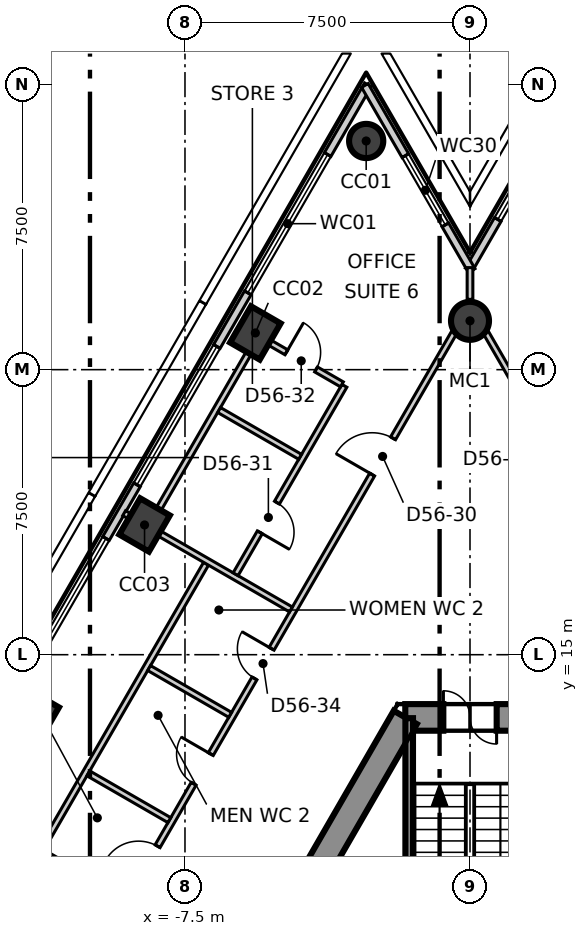
"""IFC4 building model, lengths in metres.
Left out: names, types, materials, properties, quantities, classifications, styles, units other than length and angle.
Written with IfcOpenShell. Run it as: python <this file> out.ifc"""

import sys

from ifc_helpers import new_model, si_unit, direction, frame, frame_2d, origin, origin_2d, place, context, subcontext, project, spatial, polyline, rectangle, circle, outline, extrude, element, fill, save


model = new_model("IFC4")
c1 = context("Model", 3, precision=1e-05, world=origin(), true_north=direction((0.0, 1.0)))
c2 = subcontext(c1, "Body", "Model", "MODEL_VIEW")
j1 = project(units=[si_unit("LENGTHUNIT", "METRE"), si_unit("PLANEANGLEUNIT", "RADIAN")], contexts=[c1])
p1 = place(None, origin())
s1 = spatial("IfcSite", under=j1, at=p1, CompositionType="ELEMENT")
p2 = place(p1, origin())
s2 = spatial("IfcBuilding", under=s1, at=p2, CompositionType="ELEMENT")
p3 = place(p2, frame((0.0, 0.0, 239.3)))
s3 = spatial("IfcBuildingStorey", under=s2, at=p3, CompositionType="ELEMENT", Elevation=239.3)
p4 = place(p3, frame((1.703, 13.35, -0.3), z_axis=(0.0, 0.0, 1.0), x_axis=(-1.0, 0.0, 0.0)))
e1 = element("IfcWall", 1, at=p4, inside=s3, PredefinedType="SHEAR", context=c2, shape_type="SweptSolid", body=[
    extrude(outline(polyline([(-0.202, -0.35), (1.703, -0.35), (3.608, -0.35), (3.204, 0.35), (1.703, 0.35), (0.202, 0.35), (-0.202, -0.35)])), origin(), (0.0, 0.0, 1.0), 4.0),
])
p5 = place(p4, frame((1.003, 0.0, 0.3)))
e2 = element("IfcOpeningElement", 2, at=p5, cuts=e1, PredefinedType="OPENING", context=c2, shape_type="SweptSolid", body=[
    extrude(rectangle(XDim=1.4, YDim=2.1, at=frame_2d((0.7, 1.05))), frame((0.0, 0.36, 0.0), z_axis=(0.0, -1.0, 0.0), x_axis=(1.0, 0.0, 0.0)), (0.0, 0.0, 1.0), 0.72),
])
p6 = place(p3, frame((-1.703, 13.35, -0.3), z_axis=(0.0, 0.0, 1.0), x_axis=(-0.500011533395, -0.866018744874, 0.0)))
e3 = element("IfcWall", 3, at=p6, inside=s3, PredefinedType="SHEAR", context=c2, shape_type="SweptSolid", body=[
    extrude(outline(polyline([(-0.202, -0.35), (1.782, -0.35), (3.766, -0.35), (5.75, -0.35), (7.734, -0.35), (9.718, -0.35), (11.702, -0.35), (13.686, -0.35), (15.67, -0.35), (17.654, -0.35), (19.638, -0.35), (21.622, -0.35), (21.218, 0.35), (19.307, 0.35), (17.397, 0.35), (15.486, 0.35), (13.576, 0.35), (11.665, 0.35), (9.755, 0.35), (7.844, 0.35), (5.934, 0.35), (4.023, 0.35), (2.113, 0.35), (0.202, 0.35), (-0.202, -0.35)])), origin(), (0.0, 0.0, 1.0), 4.0),
])
p7 = place(p6, frame((10.16, 0.0, 0.3)))
e4 = element("IfcOpeningElement", 4, at=p7, cuts=e3, PredefinedType="OPENING", context=c2, shape_type="SweptSolid", body=[
    extrude(rectangle(XDim=1.1, YDim=2.1, at=frame_2d((0.55, 1.05))), frame((0.0, 0.36, 0.0), z_axis=(0.0, -1.0, 0.0), x_axis=(1.0, 0.0, 0.0)), (0.0, 0.0, 1.0), 0.72),
])
p8 = place(p3, frame((-2.732, 28.517, -0.3), z_axis=(0.0, 0.0, 1.0), x_axis=(0.5, 0.866025403784, 0.0)))
e5 = element("IfcColumn", 5, at=p8, inside=s3, PredefinedType="COLUMN", context=c2, shape_type="SweptSolid", body=[
    extrude(circle(Radius=0.45, at=origin_2d()), origin(), (0.0, 0.0, 1.0), 4.0),
])
for number, where, z_axis, x_axis in (
    (6, (-5.648, 23.466, -0.3), (0.0, 0.0, 1.0), (0.5, 0.866, 0.0)),
    (7, (-8.564, 18.414, -0.3), (0.0, 0.0, 1.0), (0.5, 0.866, 0.0)),
    (8, (-11.481, 13.363, -0.3), (0.0, 0.0, 1.0), (0.5, 0.866, 0.0)),
):
    element("IfcColumn", number, at=place(p3, frame(where, z_axis=z_axis, x_axis=x_axis)), inside=s3, PredefinedType="COLUMN", context=c2, shape_type="SweptSolid", body=[
        extrude(rectangle(XDim=1.1, YDim=0.9, at=origin_2d()), origin(), (0.0, 0.0, 1.0), 4.0),
    ])
p9 = place(p3, frame((0.0, 23.785, -0.3), z_axis=(0.0, 0.0, 1.0), x_axis=(1.0, 0.0, 0.0)))
e9 = element("IfcColumn", 9, at=p9, inside=s3, PredefinedType="COLUMN", context=c2, shape_type="SweptSolid", body=[
    extrude(circle(Radius=0.5, at=origin_2d()), origin(), (0.0, 0.0, 1.0), 4.0),
])
p10 = place(p3, frame((-2.687, 29.995, 0.0), z_axis=(0.0, 0.0, 1.0), x_axis=(-0.499992950893, -0.86602947355, 0.0)))
e10 = element("IfcWall", 10, at=p10, inside=s3, PredefinedType="ELEMENTEDWALL", context=c2, shape_type="SweptSolid", body=[
    extrude(rectangle(XDim=49.247, YDim=0.2, at=frame_2d((24.624, 0.0))), origin(), (0.0, 0.0, 1.0), 3.7),
])
p11 = place(p10, frame((2.119, 0.0, 0.9)))
e11 = element("IfcOpeningElement", 11, at=p11, cuts=e10, PredefinedType="OPENING", context=c2, shape_type="SweptSolid", body=[
    extrude(rectangle(XDim=4.2, YDim=2.5, at=frame_2d((2.1, 1.25))), frame((0.0, 0.11, 0.0), z_axis=(0.0, -1.0, 0.0), x_axis=(1.0, 0.0, 0.0)), (0.0, 0.0, 1.0), 0.22),
])
p12 = place(p10, frame((7.951, 0.0, 0.9)))
e12 = element("IfcOpeningElement", 12, at=p12, cuts=e10, PredefinedType="OPENING", context=c2, shape_type="SweptSolid", body=[
    extrude(rectangle(XDim=4.2, YDim=2.5, at=frame_2d((2.1, 1.25))), frame((0.0, 0.11, 0.0), z_axis=(0.0, -1.0, 0.0), x_axis=(1.0, 0.0, 0.0)), (0.0, 0.0, 1.0), 0.22),
])
p13 = place(p10, frame((13.784, 0.0, 0.9)))
e13 = element("IfcOpeningElement", 13, at=p13, cuts=e10, PredefinedType="OPENING", context=c2, shape_type="SweptSolid", body=[
    extrude(rectangle(XDim=4.2, YDim=2.5, at=frame_2d((2.1, 1.25))), frame((0.0, 0.11, 0.0), z_axis=(0.0, -1.0, 0.0), x_axis=(1.0, 0.0, 0.0)), (0.0, 0.0, 1.0), 0.22),
])
p14 = place(p10, frame((19.617, 0.0, 0.9)))
e14 = element("IfcOpeningElement", 14, at=p14, cuts=e10, PredefinedType="OPENING", context=c2, shape_type="SweptSolid", body=[
    extrude(rectangle(XDim=4.2, YDim=2.5, at=frame_2d((2.1, 1.25))), frame((0.0, 0.11, 0.0), z_axis=(0.0, -1.0, 0.0), x_axis=(1.0, 0.0, 0.0)), (0.0, 0.0, 1.0), 0.22),
])
p15 = place(p10, frame((25.449, 0.0, 0.9)))
e15 = element("IfcOpeningElement", 15, at=p15, cuts=e10, PredefinedType="OPENING", context=c2, shape_type="SweptSolid", body=[
    extrude(rectangle(XDim=4.2, YDim=2.5, at=frame_2d((2.1, 1.25))), frame((0.0, 0.11, 0.0), z_axis=(0.0, -1.0, 0.0), x_axis=(1.0, 0.0, 0.0)), (0.0, 0.0, 1.0), 0.22),
])
p16 = place(p10, frame((31.282, 0.0, 0.9)))
e16 = element("IfcOpeningElement", 16, at=p16, cuts=e10, PredefinedType="OPENING", context=c2, shape_type="SweptSolid", body=[
    extrude(rectangle(XDim=4.2, YDim=2.5, at=frame_2d((2.1, 1.25))), frame((0.0, 0.11, 0.0), z_axis=(0.0, -1.0, 0.0), x_axis=(1.0, 0.0, 0.0)), (0.0, 0.0, 1.0), 0.22),
])
p17 = place(p10, frame((37.115, 0.0, 0.9)))
e17 = element("IfcOpeningElement", 17, at=p17, cuts=e10, PredefinedType="OPENING", context=c2, shape_type="SweptSolid", body=[
    extrude(rectangle(XDim=4.2, YDim=2.5, at=frame_2d((2.1, 1.25))), frame((0.0, 0.11, 0.0), z_axis=(0.0, -1.0, 0.0), x_axis=(1.0, 0.0, 0.0)), (0.0, 0.0, 1.0), 0.22),
])
p18 = place(p10, frame((42.947, 0.0, 0.9)))
e18 = element("IfcOpeningElement", 18, at=p18, cuts=e10, PredefinedType="OPENING", context=c2, shape_type="SweptSolid", body=[
    extrude(rectangle(XDim=4.2, YDim=2.5, at=frame_2d((2.1, 1.25))), frame((0.0, 0.11, 0.0), z_axis=(0.0, -1.0, 0.0), x_axis=(1.0, 0.0, 0.0)), (0.0, 0.0, 1.0), 0.22),
])
p19 = place(p3, frame((2.777, 29.995, 0.0), z_axis=(0.0, 0.0, 1.0), x_axis=(-0.499957919771, -0.866049697453, 0.0)))
e19 = element("IfcWall", 19, at=p19, inside=s3, PredefinedType="ELEMENTEDWALL", context=c2, shape_type="SweptSolid", body=[
    extrude(rectangle(XDim=5.625, YDim=0.2, at=frame_2d((2.812, 0.0))), origin(), (0.0, 0.0, 1.0), 3.7),
])
p20 = place(p19, frame((1.99, 0.0, 0.9)))
e20 = element("IfcOpeningElement", 20, at=p20, cuts=e19, PredefinedType="OPENING", context=c2, shape_type="SweptSolid", body=[
    extrude(rectangle(XDim=2.1, YDim=2.5, at=frame_2d((1.05, 1.25))), frame((0.0, 0.11, 0.0), z_axis=(0.0, -1.0, 0.0), x_axis=(1.0, 0.0, 0.0)), (0.0, 0.0, 1.0), 0.22),
])
p21 = place(p3, frame((0.045, 25.107, 0.0), z_axis=(0.0, 0.0, 1.0), x_axis=(-0.499957919771, 0.866049697453, 0.0)))
e21 = element("IfcWall", 21, at=p21, inside=s3, PredefinedType="ELEMENTEDWALL", context=c2, shape_type="SweptSolid", body=[
    extrude(rectangle(XDim=5.625, YDim=0.2, at=frame_2d((2.812, 0.0))), origin(), (0.0, 0.0, 1.0), 3.7),
])
p22 = place(p21, frame((1.39, 0.0, 0.9)))
e22 = element("IfcOpeningElement", 22, at=p22, cuts=e21, PredefinedType="OPENING", context=c2, shape_type="SweptSolid", body=[
    extrude(rectangle(XDim=2.1, YDim=2.5, at=frame_2d((1.05, 1.25))), frame((0.0, 0.11, 0.0), z_axis=(0.0, -1.0, 0.0), x_axis=(1.0, 0.0, 0.0)), (0.0, 0.0, 1.0), 0.22),
])
p23 = place(p3, frame((-20.883, -11.97, 0.0), z_axis=(0.0, 0.0, 1.0), x_axis=(0.500006150555, 0.866021852731, 0.0)))
e23 = element("IfcWall", 23, at=p23, inside=s3, PredefinedType="PARTITIONING", context=c2, shape_type="SweptSolid", body=[
    extrude(rectangle(XDim=41.766, YDim=0.15, at=frame_2d((20.883, 0.0))), origin(), (0.0, 0.0, 1.0), 3.7),
])
p24 = place(p23, frame((36.616, 0.0, 0.0)))
e24 = element("IfcOpeningElement", 24, at=p24, cuts=e23, PredefinedType="OPENING", context=c2, shape_type="SweptSolid", body=[
    extrude(rectangle(XDim=1.1, YDim=2.1, at=frame_2d((0.55, 1.05))), frame((0.0, 0.085, 0.0), z_axis=(0.0, -1.0, 0.0), x_axis=(1.0, 0.0, 0.0)), (0.0, 0.0, 1.0), 0.17),
])
p25 = place(p23, frame((21.723, 0.0, 0.0)))
e25 = element("IfcOpeningElement", 25, at=p25, cuts=e23, PredefinedType="OPENING", context=c2, shape_type="SweptSolid", body=[
    extrude(rectangle(XDim=1.1, YDim=2.1, at=frame_2d((0.55, 1.05))), frame((0.0, 0.085, 0.0), z_axis=(0.0, -1.0, 0.0), x_axis=(1.0, 0.0, 0.0)), (0.0, 0.0, 1.0), 0.17),
])
p26 = place(p23, frame((30.423, 0.0, 0.0)))
e26 = element("IfcOpeningElement", 26, at=p26, cuts=e23, PredefinedType="OPENING", context=c2, shape_type="SweptSolid", body=[
    extrude(rectangle(XDim=0.9, YDim=2.1, at=frame_2d((0.45, 1.05))), frame((0.0, 0.085, 0.0), z_axis=(0.0, -1.0, 0.0), x_axis=(1.0, 0.0, 0.0)), (0.0, 0.0, 1.0), 0.17),
])
p27 = place(p23, frame((27.223, 0.0, 0.0)))
e27 = element("IfcOpeningElement", 27, at=p27, cuts=e23, PredefinedType="OPENING", context=c2, shape_type="SweptSolid", body=[
    extrude(rectangle(XDim=0.9, YDim=2.1, at=frame_2d((0.45, 1.05))), frame((0.0, 0.085, 0.0), z_axis=(0.0, -1.0, 0.0), x_axis=(1.0, 0.0, 0.0)), (0.0, 0.0, 1.0), 0.17),
])
p28 = place(p23, frame((24.323, 0.0, 0.0)))
e28 = element("IfcOpeningElement", 28, at=p28, cuts=e23, PredefinedType="OPENING", context=c2, shape_type="SweptSolid", body=[
    extrude(rectangle(XDim=1.0, YDim=2.1, at=frame_2d((0.5, 1.05))), frame((0.0, 0.085, 0.0), z_axis=(0.0, -1.0, 0.0), x_axis=(1.0, 0.0, 0.0)), (0.0, 0.0, 1.0), 0.17),
])
p29 = place(p23, frame((17.358, 0.0, 0.0)))
e29 = element("IfcOpeningElement", 29, at=p29, cuts=e23, PredefinedType="OPENING", context=c2, shape_type="SweptSolid", body=[
    extrude(rectangle(XDim=1.0, YDim=2.1, at=frame_2d((0.5, 1.05))), frame((0.0, 0.085, 0.0), z_axis=(0.0, -1.0, 0.0), x_axis=(1.0, 0.0, 0.0)), (0.0, 0.0, 1.0), 0.17),
])
p30 = place(p23, frame((6.825, 0.0, 0.0)))
e30 = element("IfcOpeningElement", 30, at=p30, cuts=e23, PredefinedType="OPENING", context=c2, shape_type="SweptSolid", body=[
    extrude(rectangle(XDim=1.1, YDim=2.1, at=frame_2d((0.55, 1.05))), frame((0.0, 0.085, 0.0), z_axis=(0.0, -1.0, 0.0), x_axis=(1.0, 0.0, 0.0)), (0.0, 0.0, 1.0), 0.17),
])
p31 = place(p3, frame((-11.308, 9.837, 0.0), z_axis=(0.0, 0.0, 1.0), x_axis=(0.499958218515, 0.866049524992, 0.0)))
e31 = element("IfcWall", 31, at=p31, inside=s3, PredefinedType="PARTITIONING", context=c2, shape_type="SweptSolid", body=[
    extrude(rectangle(XDim=8.725, YDim=0.15, at=frame_2d((4.362, 0.0))), origin(), (0.0, 0.0, 1.0), 3.7),
])
for number, where, z_axis, x_axis in (
    (32, (-11.244, 9.8, 0.0), (0.0, 0.0, 1.0), (0.866, -0.5, 0.0)),
    (33, (-10.044, 11.878, 0.0), (0.0, 0.0, 1.0), (0.866, -0.5, 0.0)),
):
    element("IfcWall", number, at=place(p3, frame(where, z_axis=z_axis, x_axis=x_axis)), inside=s3, PredefinedType="PARTITIONING", context=c2, shape_type="SweptSolid", body=[
        extrude(rectangle(XDim=2.463, YDim=0.15, at=frame_2d((1.231, 0.0))), origin(), (0.0, 0.0, 1.0), 3.7),
    ])
p32 = place(p3, frame((-9.101, 18.724, 0.0), z_axis=(0.0, 0.0, 1.0), x_axis=(0.866065287345, -0.499930913282, 0.0)))
e34 = element("IfcWall", 34, at=p32, inside=s3, PredefinedType="PARTITIONING", context=c2, shape_type="SweptSolid", body=[
    extrude(rectangle(XDim=5.069, YDim=0.15, at=frame_2d((2.535, 0.0))), origin(), (0.0, 0.0, 1.0), 3.7),
])
p33 = place(p3, frame((-8.444, 14.649, 0.0), z_axis=(0.0, 0.0, 1.0), x_axis=(0.86612451545, -0.499828294254, 0.0)))
e35 = element("IfcWall", 35, at=p33, inside=s3, PredefinedType="PARTITIONING", context=c2, shape_type="SweptSolid", body=[
    extrude(rectangle(XDim=2.463, YDim=0.15, at=frame_2d((1.231, 0.0))), origin(), (0.0, 0.0, 1.0), 3.7),
])
p34 = place(p3, frame((0.0, 24.35, 0.0), z_axis=(0.0, 0.0, 1.0), x_axis=(0.0, 1.0, 0.0)))
e36 = element("IfcWall", 36, at=p34, inside=s3, PredefinedType="PARTITIONING", context=c2, shape_type="SweptSolid", body=[
    extrude(rectangle(XDim=0.835, YDim=0.15, at=frame_2d((0.417, 0.0))), origin(), (0.0, 0.0, 1.0), 3.7),
])
p35 = place(p3, frame((0.075, 24.07, 0.0), z_axis=(0.0, 0.0, 1.0), x_axis=(0.500006834213, -0.866021458014, 0.0)))
e37 = element("IfcWall", 37, at=p35, inside=s3, PredefinedType="PARTITIONING", context=c2, shape_type="SweptSolid", body=[
    extrude(rectangle(XDim=41.616, YDim=0.15, at=frame_2d((20.808, 0.0))), origin(), (0.0, 0.0, 1.0), 3.7),
])
p36 = place(p35, frame((36.616, 0.0, 0.0)))
e38 = element("IfcOpeningElement", 38, at=p36, cuts=e37, PredefinedType="OPENING", context=c2, shape_type="SweptSolid", body=[
    extrude(rectangle(XDim=1.1, YDim=2.1, at=frame_2d((0.55, 1.05))), frame((0.0, 0.085, 0.0), z_axis=(0.0, -1.0, 0.0), x_axis=(1.0, 0.0, 0.0)), (0.0, 0.0, 1.0), 0.17),
])
p37 = place(p35, frame((29.024, 0.0, 0.0)))
e39 = element("IfcOpeningElement", 39, at=p37, cuts=e37, PredefinedType="OPENING", context=c2, shape_type="SweptSolid", body=[
    extrude(rectangle(XDim=1.0, YDim=2.1, at=frame_2d((0.5, 1.05))), frame((0.0, 0.085, 0.0), z_axis=(0.0, -1.0, 0.0), x_axis=(1.0, 0.0, 0.0)), (0.0, 0.0, 1.0), 0.17),
])
p38 = place(p35, frame((23.19, 0.0, 0.0)))
e40 = element("IfcOpeningElement", 40, at=p38, cuts=e37, PredefinedType="OPENING", context=c2, shape_type="SweptSolid", body=[
    extrude(rectangle(XDim=1.0, YDim=2.1, at=frame_2d((0.5, 1.05))), frame((0.0, 0.085, 0.0), z_axis=(0.0, -1.0, 0.0), x_axis=(1.0, 0.0, 0.0)), (0.0, 0.0, 1.0), 0.17),
])
p39 = place(p35, frame((14.458, 0.0, 0.0)))
e41 = element("IfcOpeningElement", 41, at=p39, cuts=e37, PredefinedType="OPENING", context=c2, shape_type="SweptSolid", body=[
    extrude(rectangle(XDim=1.1, YDim=2.1, at=frame_2d((0.55, 1.05))), frame((0.0, 0.085, 0.0), z_axis=(0.0, -1.0, 0.0), x_axis=(1.0, 0.0, 0.0)), (0.0, 0.0, 1.0), 0.17),
])
p40 = place(p35, frame((3.993, 0.0, 0.0)))
e42 = element("IfcOpeningElement", 42, at=p40, cuts=e37, PredefinedType="OPENING", context=c2, shape_type="SweptSolid", body=[
    extrude(rectangle(XDim=1.1, YDim=2.1, at=frame_2d((0.55, 1.05))), frame((0.0, 0.085, 0.0), z_axis=(0.0, -1.0, 0.0), x_axis=(1.0, 0.0, 0.0)), (0.0, 0.0, 1.0), 0.17),
])
p41 = place(p3, frame((-8.43, 18.423, 0.0), z_axis=(0.0, 0.0, 1.0), x_axis=(0.500069422629, 0.865985318901, 0.0)))
e43 = element("IfcWall", 43, at=p41, inside=s3, PredefinedType="PARTITIONING", context=c2, shape_type="SweptSolid", body=[
    extrude(rectangle(XDim=5.725, YDim=0.15, at=frame_2d((2.863, 0.0))), origin(), (0.0, 0.0, 1.0), 2.95),
])
p42 = place(p3, frame((-6.168, 17.117, 0.0), z_axis=(0.0, 0.0, 1.0), x_axis=(0.500069422629, 0.865985318901, 0.0)))
e44 = element("IfcWall", 44, at=p42, inside=s3, PredefinedType="PARTITIONING", context=c2, shape_type="SweptSolid", body=[
    extrude(rectangle(XDim=5.725, YDim=0.15, at=frame_2d((2.863, 0.0))), origin(), (0.0, 0.0, 1.0), 3.7),
])
p43 = place(p42, frame((1.275, 0.0, 0.0)))
e45 = element("IfcOpeningElement", 45, at=p43, cuts=e44, PredefinedType="OPENING", context=c2, shape_type="SweptSolid", body=[
    extrude(rectangle(XDim=0.9, YDim=2.1, at=frame_2d((0.45, 1.05))), frame((0.0, 0.085, 0.0), z_axis=(0.0, -1.0, 0.0), x_axis=(1.0, 0.0, 0.0)), (0.0, 0.0, 1.0), 0.17),
])
p44 = place(p3, frame((-5.502, 23.344, 0.0), z_axis=(0.0, 0.0, 1.0), x_axis=(0.866000604582, -0.500042951019, 0.0)))
e46 = element("IfcWall", 46, at=p44, inside=s3, PredefinedType="PARTITIONING", context=c2, shape_type="SweptSolid", body=[
    extrude(rectangle(XDim=2.462, YDim=0.15, at=frame_2d((1.231, 0.0))), origin(), (0.0, 0.0, 1.0), 3.7),
])
p45 = place(p44, frame((0.775, 0.0, 0.0)))
e47 = element("IfcOpeningElement", 47, at=p45, cuts=e46, PredefinedType="OPENING", context=c2, shape_type="SweptSolid", body=[
    extrude(rectangle(XDim=0.9, YDim=2.1, at=frame_2d((0.45, 1.05))), frame((0.0, 0.085, 0.0), z_axis=(0.0, -1.0, 0.0), x_axis=(1.0, 0.0, 0.0)), (0.0, 0.0, 1.0), 0.17),
])
p46 = place(p3, frame((-6.602, 21.438, 0.0), z_axis=(0.0, 0.0, 1.0), x_axis=(0.866025399526, -0.500000007376, 0.0)))
e48 = element("IfcWall", 48, at=p46, inside=s3, PredefinedType="PARTITIONING", context=c2, shape_type="SweptSolid", body=[
    extrude(rectangle(XDim=2.462, YDim=0.15, at=frame_2d((1.231, 0.0))), origin(), (0.0, 0.0, 1.0), 3.7),
])
p47 = place(p3, frame((-1.6, 6.615, 0.0), z_axis=(0.0, 0.0, 1.0), x_axis=(0.0, 1.0, 0.0)))
e49 = element("IfcWall", 49, at=p47, inside=s3, PredefinedType="SOLIDWALL", context=c2, shape_type="SweptSolid", body=[
    extrude(rectangle(XDim=6.715, YDim=0.2, at=frame_2d((3.357, 0.0))), origin(), (0.0, 0.0, 1.0), 3.7),
])
p48 = place(p11, origin())
e50 = element("IfcWindow", 50, at=p48, inside=s3, PartitioningType="SINGLE_PANEL", PredefinedType="WINDOW", context=c2, shape_type="SweptSolid", body=[
    extrude(rectangle(XDim=4.2, YDim=2.5, at=frame_2d((2.1, 1.25))), frame((0.0, 0.03, 0.0), z_axis=(0.0, -1.0, 0.0), x_axis=(1.0, 0.0, 0.0)), (0.0, 0.0, 1.0), 0.06),
])
fill(e11, e50)
p49 = place(p12, origin())
e51 = element("IfcWindow", 51, at=p49, inside=s3, PartitioningType="SINGLE_PANEL", PredefinedType="WINDOW", context=c2, shape_type="SweptSolid", body=[
    extrude(rectangle(XDim=4.2, YDim=2.5, at=frame_2d((2.1, 1.25))), frame((0.0, 0.03, 0.0), z_axis=(0.0, -1.0, 0.0), x_axis=(1.0, 0.0, 0.0)), (0.0, 0.0, 1.0), 0.06),
])
fill(e12, e51)
p50 = place(p13, origin())
e52 = element("IfcWindow", 52, at=p50, inside=s3, PartitioningType="SINGLE_PANEL", PredefinedType="WINDOW", context=c2, shape_type="SweptSolid", body=[
    extrude(rectangle(XDim=4.2, YDim=2.5, at=frame_2d((2.1, 1.25))), frame((0.0, 0.03, 0.0), z_axis=(0.0, -1.0, 0.0), x_axis=(1.0, 0.0, 0.0)), (0.0, 0.0, 1.0), 0.06),
])
fill(e13, e52)
p51 = place(p20, origin())
e53 = element("IfcWindow", 53, at=p51, inside=s3, PartitioningType="SINGLE_PANEL", PredefinedType="WINDOW", context=c2, shape_type="SweptSolid", body=[
    extrude(rectangle(XDim=2.1, YDim=2.5, at=frame_2d((1.05, 1.25))), frame((0.0, 0.03, 0.0), z_axis=(0.0, -1.0, 0.0), x_axis=(1.0, 0.0, 0.0)), (0.0, 0.0, 1.0), 0.06),
])
fill(e20, e53)
p52 = place(p22, origin())
e54 = element("IfcWindow", 54, at=p52, inside=s3, PartitioningType="SINGLE_PANEL", PredefinedType="WINDOW", context=c2, shape_type="SweptSolid", body=[
    extrude(rectangle(XDim=2.1, YDim=2.5, at=frame_2d((1.05, 1.25))), frame((0.0, 0.03, 0.0), z_axis=(0.0, -1.0, 0.0), x_axis=(1.0, 0.0, 0.0)), (0.0, 0.0, 1.0), 0.06),
])
fill(e22, e54)
p53 = place(p24, origin())
e55 = element("IfcDoor", 55, at=p53, inside=s3, OperationType="SINGLE_SWING_RIGHT", PredefinedType="DOOR", context=c2, shape_type="SweptSolid", body=[
    extrude(rectangle(XDim=1.1, YDim=2.1, at=frame_2d((0.55, 1.05))), frame((0.0, 0.025, 0.0), z_axis=(0.0, -1.0, 0.0), x_axis=(1.0, 0.0, 0.0)), (0.0, 0.0, 1.0), 0.05),
])
fill(e24, e55)
p54 = place(p43, origin())
e56 = element("IfcDoor", 56, at=p54, inside=s3, OperationType="SINGLE_SWING_LEFT", PredefinedType="DOOR", context=c2, shape_type="SweptSolid", body=[
    extrude(rectangle(XDim=0.9, YDim=2.1, at=frame_2d((0.45, 1.05))), frame((0.0, 0.025, 0.0), z_axis=(0.0, -1.0, 0.0), x_axis=(1.0, 0.0, 0.0)), (0.0, 0.0, 1.0), 0.05),
])
fill(e45, e56)
p55 = place(p45, origin())
e57 = element("IfcDoor", 57, at=p55, inside=s3, OperationType="SINGLE_SWING_RIGHT", PredefinedType="DOOR", context=c2, shape_type="SweptSolid", body=[
    extrude(rectangle(XDim=0.9, YDim=2.1, at=frame_2d((0.45, 1.05))), frame((0.0, 0.025, 0.0), z_axis=(0.0, -1.0, 0.0), x_axis=(1.0, 0.0, 0.0)), (0.0, 0.0, 1.0), 0.05),
])
fill(e47, e57)
p56 = place(p26, origin())
e58 = element("IfcDoor", 58, at=p56, inside=s3, OperationType="SINGLE_SWING_LEFT", PredefinedType="DOOR", context=c2, shape_type="SweptSolid", body=[
    extrude(rectangle(XDim=0.9, YDim=2.1, at=frame_2d((0.45, 1.05))), frame((0.0, 0.025, 0.0), z_axis=(0.0, -1.0, 0.0), x_axis=(1.0, 0.0, 0.0)), (0.0, 0.0, 1.0), 0.05),
])
fill(e26, e58)
p57 = place(p27, origin())
e59 = element("IfcDoor", 59, at=p57, inside=s3, OperationType="SINGLE_SWING_LEFT", PredefinedType="DOOR", context=c2, shape_type="SweptSolid", body=[
    extrude(rectangle(XDim=0.9, YDim=2.1, at=frame_2d((0.45, 1.05))), frame((0.0, 0.025, 0.0), z_axis=(0.0, -1.0, 0.0), x_axis=(1.0, 0.0, 0.0)), (0.0, 0.0, 1.0), 0.05),
])
fill(e27, e59)
p58 = place(p28, origin())
e60 = element("IfcDoor", 60, at=p58, inside=s3, OperationType="SINGLE_SWING_RIGHT", PredefinedType="DOOR", context=c2, shape_type="SweptSolid", body=[
    extrude(rectangle(XDim=1.0, YDim=2.1, at=frame_2d((0.5, 1.05))), frame((0.0, 0.025, 0.0), z_axis=(0.0, -1.0, 0.0), x_axis=(1.0, 0.0, 0.0)), (0.0, 0.0, 1.0), 0.05),
])
fill(e28, e60)
p59 = place(p5, origin())
e61 = element("IfcDoor", 61, at=p59, inside=s3, OperationType="DOUBLE_DOOR_SINGLE_SWING", PredefinedType="DOOR", context=c2, shape_type="SweptSolid", body=[
    extrude(rectangle(XDim=1.4, YDim=2.1, at=frame_2d((0.7, 1.05))), frame((0.0, 0.025, 0.0), z_axis=(0.0, -1.0, 0.0), x_axis=(1.0, 0.0, 0.0)), (0.0, 0.0, 1.0), 0.05),
])
fill(e2, e61)
save(model, sys.argv[1])
